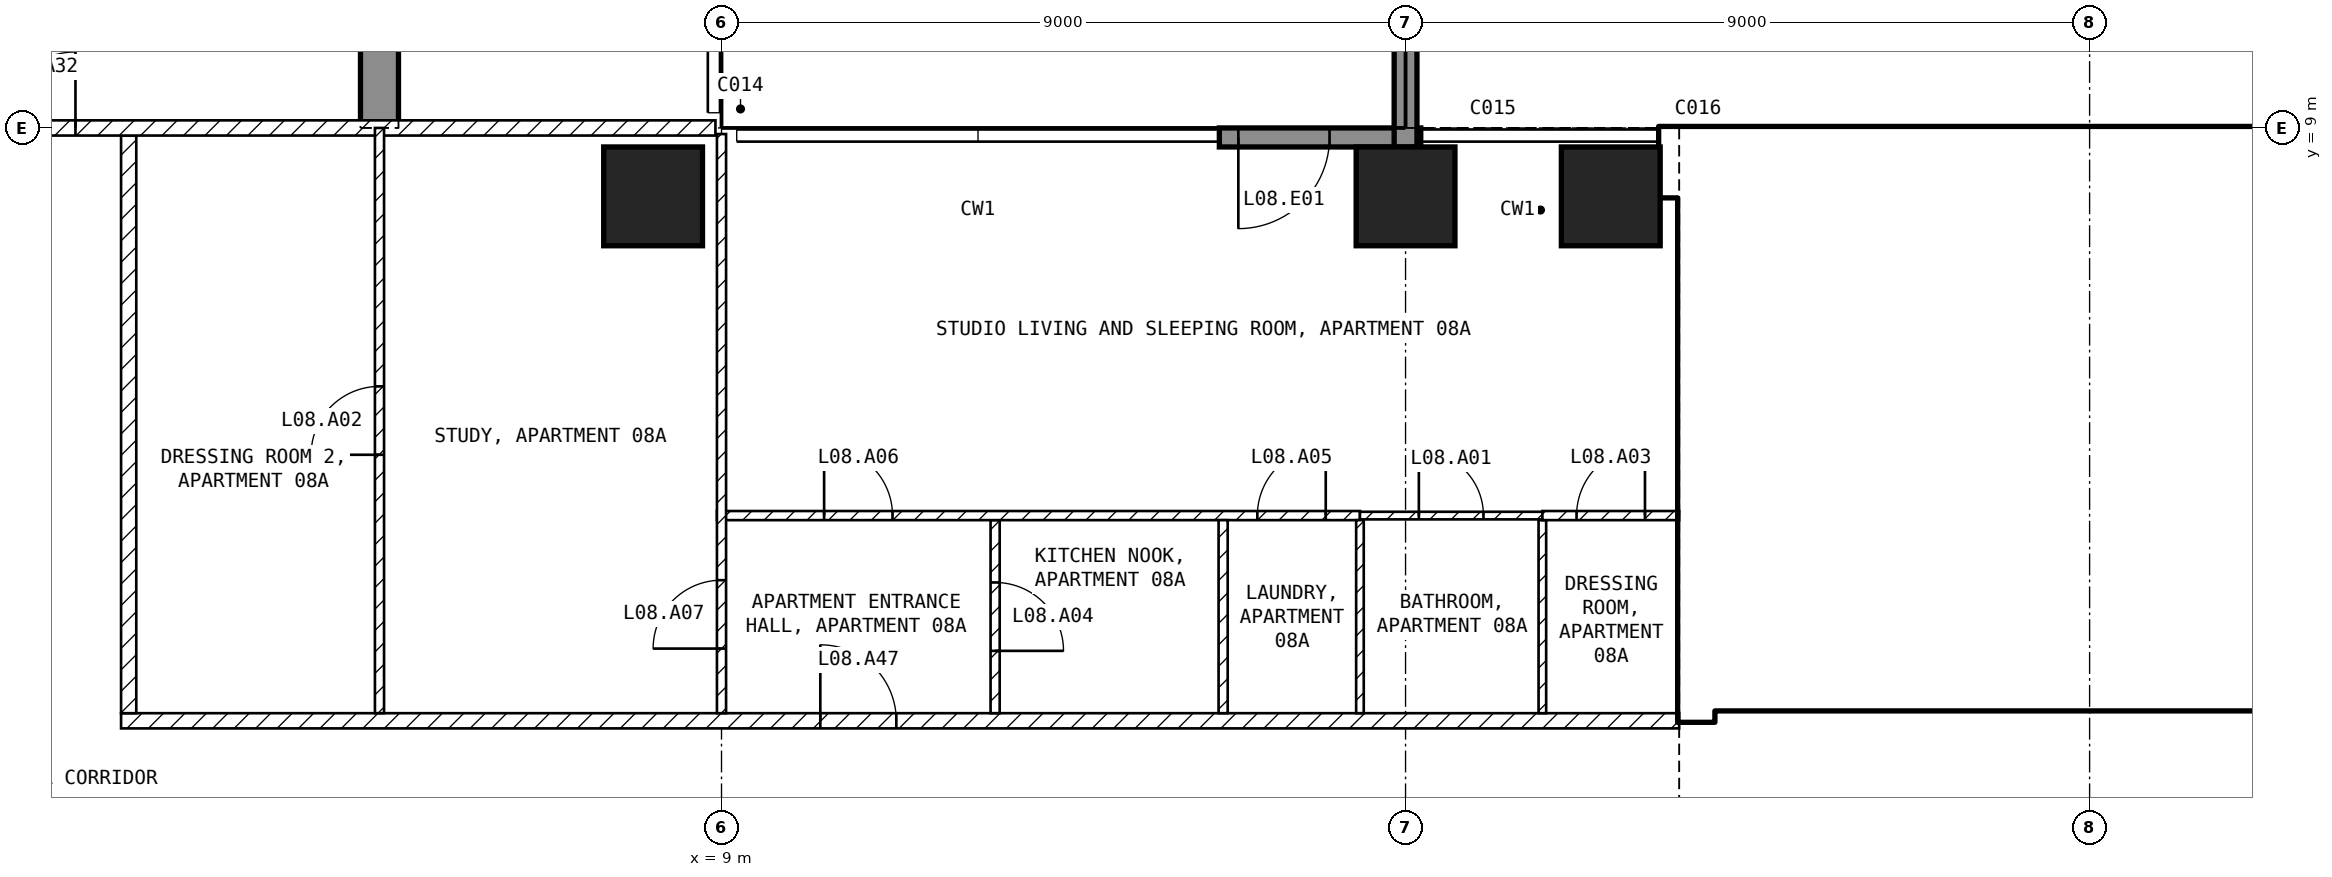
"""IFC4 building model, lengths in metres.
Left out: names, types, materials, properties, quantities, classifications, styles, units other than length and angle.
Written with IfcOpenShell. Run it as: python <this file> out.ifc"""

import sys

from ifc_helpers import new_model, si_unit, direction, frame, frame_2d, origin, origin_2d, place, context, subcontext, project, spatial, polyline, rectangle, outline, extrude, element, fill, save


model = new_model("IFC4")
c1 = context("Model", 3, precision=1e-05, world=origin(), true_north=direction((0.0, 1.0)))
c2 = subcontext(c1, "Body", "Model", "MODEL_VIEW")
j1 = project(units=[si_unit("LENGTHUNIT", "METRE"), si_unit("PLANEANGLEUNIT", "RADIAN")], contexts=[c1])
p1 = place(None, origin())
s1 = spatial("IfcSite", under=j1, at=p1, CompositionType="ELEMENT")
p2 = place(p1, origin())
s2 = spatial("IfcBuilding", under=s1, at=p2, CompositionType="ELEMENT")
p3 = place(p2, frame((0.0, 0.0, 47.0)))
s3 = spatial("IfcBuildingStorey", under=s2, at=p3, CompositionType="ELEMENT", Elevation=47.0)
for number, where, z_axis, x_axis in (
    (1, (8.1, 8.1, -0.25), (0.0, 0.0, 1.0), (1.0, 0.0, 0.0)),
    (2, (18.0, 8.1, -0.25), (0.0, 0.0, 1.0), (1.0, 0.0, 0.0)),
    (3, (20.7, 8.1, -0.25), (0.0, 0.0, 1.0), (1.0, 0.0, 0.0)),
):
    element("IfcColumn", number, at=place(p3, frame(where, z_axis=z_axis, x_axis=x_axis)), inside=s3, PredefinedType="COLUMN", context=c2, shape_type="SweptSolid", body=[
        extrude(rectangle(XDim=1.3, YDim=1.3, at=origin_2d()), origin(), (0.0, 0.0, 1.0), 3.5),
    ])
p4 = place(p3, frame((4.25, 9.0, -0.25), z_axis=(1.0, 0.0, 0.0), x_axis=(0.0, 1.0, 0.0)))
e4 = element("IfcWall", 4, at=p4, inside=s3, PredefinedType="SHEAR", context=c2, shape_type="SweptSolid", body=[
    extrude(outline(polyline([(0.0, 0.0), (2.1, 0.0), (2.1, 2.65), (4.5, 2.65), (4.5, 0.0), (9.9, 0.0), (9.9, 2.65), (12.3, 2.65), (12.3, 0.0), (16.45, 0.0), (16.45, 3.5), (0.0, 3.5), (0.0, 0.0)])), origin(), (0.0, 0.0, 1.0), 0.5),
])
p5 = place(p3, frame((18.2, 8.875, 0.0), z_axis=(0.0, 0.0, 1.0), x_axis=(-1.0, 0.0, 0.0)))
e5 = element("IfcWall", 5, at=p5, inside=s3, PredefinedType="SOLIDWALL", context=c2, shape_type="SweptSolid", body=[
    extrude(rectangle(XDim=2.65, YDim=0.25, at=frame_2d((1.325, 0.0))), origin(), (0.0, 0.0, 1.0), 3.25),
])
p6 = place(p5, frame((1.2, 0.0, 0.0)))
e6 = element("IfcOpeningElement", 6, at=p6, cuts=e5, PredefinedType="OPENING", context=c2, shape_type="SweptSolid", body=[
    extrude(rectangle(XDim=1.2, YDim=2.4, at=frame_2d((0.6, 1.2))), frame((0.0, 0.135, 0.0), z_axis=(0.0, -1.0, 0.0), x_axis=(1.0, 0.0, 0.0)), (0.0, 0.0, 1.0), 0.27),
])
p7 = place(p3, frame((18.0, 8.75, 0.0), z_axis=(0.0, 0.0, 1.0), x_axis=(0.0, 1.0, 0.0)))
e7 = element("IfcWall", 7, at=p7, inside=s3, PredefinedType="SOLIDWALL", context=c2, shape_type="SweptSolid", body=[
    extrude(rectangle(XDim=2.95, YDim=0.3, at=frame_2d((1.475, 0.0))), origin(), (0.0, 0.0, 1.0), 3.25),
])
p8 = place(p3, frame((21.35, 8.55, 0.0), z_axis=(0.0, 0.0, 1.0), x_axis=(1.0, 0.0, 0.0)))
e8 = element("IfcWall", 8, at=p8, inside=s3, PredefinedType="SHEAR", context=c2, shape_type="SweptSolid", body=[
    extrude(rectangle(XDim=10.15, YDim=0.9, at=frame_2d((5.075, 0.0))), origin(), (0.0, 0.0, 1.0), 3.25),
])
p9 = place(p3, frame((21.825, 1.2, 0.0), z_axis=(0.0, 0.0, 1.0), x_axis=(0.0, 1.0, 0.0)))
e9 = element("IfcWall", 9, at=p9, inside=s3, PredefinedType="SHEAR", context=c2, shape_type="SweptSolid", body=[
    extrude(rectangle(XDim=6.9, YDim=0.45, at=frame_2d((3.45, 0.0))), origin(), (0.0, 0.0, 1.0), 3.25),
])
p10 = place(p3, frame((22.05, 1.45, 0.0), z_axis=(0.0, 0.0, 1.0), x_axis=(1.0, 0.0, 0.0)))
e10 = element("IfcWall", 10, at=p10, inside=s3, PredefinedType="SOLIDWALL", context=c2, shape_type="SweptSolid", body=[
    extrude(rectangle(XDim=13.05, YDim=0.2, at=frame_2d((6.525, 0.0))), origin(), (0.0, 0.0, 1.0), 3.25),
])
p11 = place(p10, frame((0.75, 0.0, 0.0)))
e11 = element("IfcOpeningElement", 11, at=p11, cuts=e10, PredefinedType="OPENING", context=c2, shape_type="SweptSolid", body=[
    extrude(rectangle(XDim=1.0, YDim=2.1, at=frame_2d((0.5, 1.05))), frame((0.0, 0.11, 0.0), z_axis=(0.0, -1.0, 0.0), x_axis=(1.0, 0.0, 0.0)), (0.0, 0.0, 1.0), 0.22),
])
p12 = place(p10, frame((3.25, 0.0, 0.0)))
e12 = element("IfcOpeningElement", 12, at=p12, cuts=e10, PredefinedType="OPENING", context=c2, shape_type="SweptSolid", body=[
    extrude(rectangle(XDim=1.0, YDim=2.1, at=frame_2d((0.5, 1.05))), frame((0.0, 0.11, 0.0), z_axis=(0.0, -1.0, 0.0), x_axis=(1.0, 0.0, 0.0)), (0.0, 0.0, 1.0), 0.22),
])
p13 = place(p3, frame((22.05, 5.15, 0.0), z_axis=(0.0, 0.0, 1.0), x_axis=(1.0, 0.0, 0.0)))
e13 = element("IfcWall", 13, at=p13, inside=s3, PredefinedType="SOLIDWALL", context=c2, shape_type="SweptSolid", body=[
    extrude(rectangle(XDim=6.3, YDim=0.2, at=frame_2d((3.15, 0.0))), origin(), (0.0, 0.0, 1.0), 3.25),
])
p14 = place(p13, frame((0.2, 0.0, 0.0)))
e14 = element("IfcOpeningElement", 14, at=p14, cuts=e13, PredefinedType="OPENING", context=c2, shape_type="SweptSolid", body=[
    extrude(rectangle(XDim=1.0, YDim=2.1, at=frame_2d((0.5, 1.05))), frame((0.0, 0.11, 0.0), z_axis=(0.0, -1.0, 0.0), x_axis=(1.0, 0.0, 0.0)), (0.0, 0.0, 1.0), 0.22),
])
p15 = place(p3, frame((28.25, 5.25, 0.0), z_axis=(0.0, 0.0, 1.0), x_axis=(0.0, 1.0, 0.0)))
e15 = element("IfcWall", 15, at=p15, inside=s3, PredefinedType="SOLIDWALL", context=c2, shape_type="SweptSolid", body=[
    extrude(rectangle(XDim=2.85, YDim=0.2, at=frame_2d((1.425, 0.0))), origin(), (0.0, 0.0, 1.0), 3.25),
])
p16 = place(p3, frame((27.2, 3.95, 0.0), z_axis=(0.0, 0.0, 1.0), x_axis=(1.0, 0.0, 0.0)))
e16 = element("IfcWall", 16, at=p16, inside=s3, PredefinedType="SOLIDWALL", context=c2, shape_type="SweptSolid", body=[
    extrude(rectangle(XDim=7.9, YDim=0.2, at=frame_2d((3.95, 0.0))), origin(), (0.0, 0.0, 1.0), 3.25),
])
p17 = place(p3, frame((27.1, 1.55, 0.0), z_axis=(0.0, 0.0, 1.0), x_axis=(0.0, 1.0, 0.0)))
e17 = element("IfcWall", 17, at=p17, inside=s3, PredefinedType="SOLIDWALL", context=c2, shape_type="SweptSolid", body=[
    extrude(rectangle(XDim=3.5, YDim=0.2, at=frame_2d((1.75, 0.0))), origin(), (0.0, 0.0, 1.0), 3.25),
])
p18 = place(p17, frame((0.6, 0.0, 0.0)))
e18 = element("IfcOpeningElement", 18, at=p18, cuts=e17, PredefinedType="OPENING", context=c2, shape_type="SweptSolid", body=[
    extrude(rectangle(XDim=1.1, YDim=2.1, at=frame_2d((0.55, 1.05))), frame((0.0, 0.11, 0.0), z_axis=(0.0, -1.0, 0.0), x_axis=(1.0, 0.0, 0.0)), (0.0, 0.0, 1.0), 0.22),
])
p19 = place(p17, frame((2.6, 0.0, 0.0)))
e19 = element("IfcOpeningElement", 19, at=p19, cuts=e17, PredefinedType="OPENING", context=c2, shape_type="SweptSolid", body=[
    extrude(rectangle(XDim=0.8, YDim=2.1, at=frame_2d((0.4, 1.05))), frame((0.0, 0.11, 0.0), z_axis=(0.0, -1.0, 0.0), x_axis=(1.0, 0.0, 0.0)), (0.0, 0.0, 1.0), 0.22),
])
p20 = place(p3, frame((1.1, 1.2, 0.0), z_axis=(0.0, 0.0, 1.0), x_axis=(1.0, 0.0, 0.0)))
e20 = element("IfcWall", 20, at=p20, inside=s3, PredefinedType="PARTITIONING", context=c2, shape_type="SweptSolid", body=[
    extrude(rectangle(XDim=20.5, YDim=0.2, at=frame_2d((10.25, 0.0))), origin(), (0.0, 0.0, 1.0), 3.25),
])
p21 = place(p20, frame((9.2, 0.0, 0.0)))
e21 = element("IfcOpeningElement", 21, at=p21, cuts=e20, PredefinedType="OPENING", context=c2, shape_type="SweptSolid", body=[
    extrude(rectangle(XDim=1.0, YDim=2.1, at=frame_2d((0.5, 1.05))), frame((0.0, 0.11, 0.0), z_axis=(0.0, -1.0, 0.0), x_axis=(1.0, 0.0, 0.0)), (0.0, 0.0, 1.0), 0.22),
])
p22 = place(p3, frame((1.2, 8.9, 0.0), z_axis=(0.0, 0.0, 1.0), x_axis=(0.0, -1.0, 0.0)))
e22 = element("IfcWall", 22, at=p22, inside=s3, PredefinedType="PARTITIONING", context=c2, shape_type="SweptSolid", body=[
    extrude(rectangle(XDim=7.6, YDim=0.2, at=frame_2d((3.8, 0.0))), origin(), (0.0, 0.0, 1.0), 3.25),
])
p23 = place(p3, frame((-8.92, 9.0, 0.0), z_axis=(0.0, 0.0, 1.0), x_axis=(1.0, 0.0, 0.0)))
e23 = element("IfcWall", 23, at=p23, inside=s3, PredefinedType="PARTITIONING", context=c2, shape_type="SweptSolid", body=[
    extrude(rectangle(XDim=17.84, YDim=0.2, at=frame_2d((8.92, 0.0))), origin(), (0.0, 0.0, 1.0), 3.25),
])
p24 = place(p23, frame((8.42, 0.0, 0.0)))
e24 = element("IfcOpeningElement", 24, at=p24, cuts=e23, PredefinedType="OPENING", context=c2, shape_type="SweptSolid", body=[
    extrude(rectangle(XDim=1.0, YDim=2.1, at=frame_2d((0.5, 1.05))), frame((0.0, 0.11, 0.0), z_axis=(0.0, -1.0, 0.0), x_axis=(1.0, 0.0, 0.0)), (0.0, 0.0, 1.0), 0.22),
])
p25 = place(p3, frame((12.6, 3.84, 0.0), z_axis=(0.0, 0.0, 1.0), x_axis=(0.0, -1.0, 0.0)))
e25 = element("IfcWall", 25, at=p25, inside=s3, PredefinedType="PARTITIONING", context=c2, shape_type="SweptSolid", body=[
    extrude(rectangle(XDim=2.54, YDim=0.12, at=frame_2d((1.27, 0.0))), origin(), (0.0, 0.0, 1.0), 3.25),
])
p26 = place(p25, frame((0.82, 0.0, 0.0)))
e26 = element("IfcOpeningElement", 26, at=p26, cuts=e25, PredefinedType="OPENING", context=c2, shape_type="SweptSolid", body=[
    extrude(rectangle(XDim=0.9, YDim=2.1, at=frame_2d((0.45, 1.05))), frame((0.0, 0.07, 0.0), z_axis=(0.0, -1.0, 0.0), x_axis=(1.0, 0.0, 0.0)), (0.0, 0.0, 1.0), 0.14),
])
p27 = place(p3, frame((8.94, 3.9, 0.0), z_axis=(0.0, 0.0, 1.0), x_axis=(1.0, 0.0, 0.0)))
e27 = element("IfcWall", 27, at=p27, inside=s3, PredefinedType="PARTITIONING", context=c2, shape_type="SweptSolid", body=[
    extrude(rectangle(XDim=8.46, YDim=0.12, at=frame_2d((4.23, 0.0))), origin(), (0.0, 0.0, 1.0), 3.25),
])
p28 = place(p27, frame((7.11, 0.0, 0.0)))
e28 = element("IfcOpeningElement", 28, at=p28, cuts=e27, PredefinedType="OPENING", context=c2, shape_type="SweptSolid", body=[
    extrude(rectangle(XDim=0.9, YDim=2.1, at=frame_2d((0.45, 1.05))), frame((0.0, 0.07, 0.0), z_axis=(0.0, -1.0, 0.0), x_axis=(1.0, 0.0, 0.0)), (0.0, 0.0, 1.0), 0.14),
])
p29 = place(p27, frame((1.41, 0.0, 0.0)))
e29 = element("IfcOpeningElement", 29, at=p29, cuts=e27, PredefinedType="OPENING", context=c2, shape_type="SweptSolid", body=[
    extrude(rectangle(XDim=0.9, YDim=2.1, at=frame_2d((0.45, 1.05))), frame((0.0, 0.07, 0.0), z_axis=(0.0, -1.0, 0.0), x_axis=(1.0, 0.0, 0.0)), (0.0, 0.0, 1.0), 0.14),
])
p30 = place(p3, frame((9.0, 1.3, 0.0), z_axis=(0.0, 0.0, 1.0), x_axis=(0.0, 1.0, 0.0)))
e30 = element("IfcWall", 30, at=p30, inside=s3, PredefinedType="PARTITIONING", context=c2, shape_type="SweptSolid", body=[
    extrude(rectangle(XDim=7.62, YDim=0.12, at=frame_2d((3.81, 0.0))), origin(), (0.0, 0.0, 1.0), 3.25),
])
p31 = place(p30, frame((0.85, 0.0, 0.0)))
e31 = element("IfcOpeningElement", 31, at=p31, cuts=e30, PredefinedType="OPENING", context=c2, shape_type="SweptSolid", body=[
    extrude(rectangle(XDim=0.9, YDim=2.1, at=frame_2d((0.45, 1.05))), frame((0.0, 0.07, 0.0), z_axis=(0.0, -1.0, 0.0), x_axis=(1.0, 0.0, 0.0)), (0.0, 0.0, 1.0), 0.14),
])
p32 = place(p3, frame((15.6, 3.84, 0.0), z_axis=(0.0, 0.0, 1.0), x_axis=(0.0, -1.0, 0.0)))
e32 = element("IfcWall", 32, at=p32, inside=s3, PredefinedType="PARTITIONING", context=c2, shape_type="SweptSolid", body=[
    extrude(rectangle(XDim=2.54, YDim=0.12, at=frame_2d((1.27, 0.0))), origin(), (0.0, 0.0, 1.0), 3.25),
])
for number, where, z_axis, x_axis in (
    (33, (17.4, 3.84, 0.0), (0.0, 0.0, 1.0), (0.0, -1.0, 0.0)),
    (34, (19.8, 3.84, 0.0), (0.0, 0.0, 1.0), (0.0, -1.0, 0.0)),
):
    element("IfcWall", number, at=place(p3, frame(where, z_axis=z_axis, x_axis=x_axis)), inside=s3, PredefinedType="PARTITIONING", context=c2, shape_type="SweptSolid", body=[
        extrude(rectangle(XDim=2.54, YDim=0.1, at=frame_2d((1.27, 0.0))), origin(), (0.0, 0.0, 1.0), 3.25),
    ])
p33 = place(p3, frame((17.4, 3.9, 0.0), z_axis=(0.0, 0.0, 1.0), x_axis=(1.0, 0.0, 0.0)))
e35 = element("IfcWall", 35, at=p33, inside=s3, PredefinedType="PARTITIONING", context=c2, shape_type="SweptSolid", body=[
    extrude(rectangle(XDim=2.4, YDim=0.1, at=frame_2d((1.2, 0.0))), origin(), (0.0, 0.0, 1.0), 3.25),
])
p34 = place(p33, frame((0.775, 0.0, 0.0)))
e36 = element("IfcOpeningElement", 36, at=p34, cuts=e35, PredefinedType="OPENING", context=c2, shape_type="SweptSolid", body=[
    extrude(rectangle(XDim=0.85, YDim=2.1, at=frame_2d((0.425, 1.05))), frame((0.0, 0.06, 0.0), z_axis=(0.0, -1.0, 0.0), x_axis=(1.0, 0.0, 0.0)), (0.0, 0.0, 1.0), 0.12),
])
p35 = place(p3, frame((19.8, 3.9, 0.0), z_axis=(0.0, 0.0, 1.0), x_axis=(1.0, 0.0, 0.0)))
e37 = element("IfcWall", 37, at=p35, inside=s3, PredefinedType="PARTITIONING", context=c2, shape_type="SweptSolid", body=[
    extrude(rectangle(XDim=1.8, YDim=0.12, at=frame_2d((0.9, 0.0))), origin(), (0.0, 0.0, 1.0), 3.25),
])
p36 = place(p35, frame((0.45, 0.0, 0.0)))
e38 = element("IfcOpeningElement", 38, at=p36, cuts=e37, PredefinedType="OPENING", context=c2, shape_type="SweptSolid", body=[
    extrude(rectangle(XDim=0.9, YDim=2.1, at=frame_2d((0.45, 1.05))), frame((0.0, 0.07, 0.0), z_axis=(0.0, -1.0, 0.0), x_axis=(1.0, 0.0, 0.0)), (0.0, 0.0, 1.0), 0.14),
])
p37 = place(p3, frame((4.5, 1.3, 0.0), z_axis=(0.0, 0.0, 1.0), x_axis=(0.0, 1.0, 0.0)))
e39 = element("IfcWall", 39, at=p37, inside=s3, PredefinedType="PARTITIONING", context=c2, shape_type="SweptSolid", body=[
    extrude(rectangle(XDim=7.7, YDim=0.12, at=frame_2d((3.85, 0.0))), origin(), (0.0, 0.0, 1.0), 3.25),
])
p38 = place(p37, frame((3.4, 0.0, 0.0)))
e40 = element("IfcOpeningElement", 40, at=p38, cuts=e39, PredefinedType="OPENING", context=c2, shape_type="SweptSolid", body=[
    extrude(rectangle(XDim=0.9, YDim=2.1, at=frame_2d((0.45, 1.05))), frame((0.0, 0.07, 0.0), z_axis=(0.0, -1.0, 0.0), x_axis=(1.0, 0.0, 0.0)), (0.0, 0.0, 1.0), 0.14),
])
p39 = place(p6, origin())
e41 = element("IfcDoor", 41, at=p39, inside=s3, OperationType="SINGLE_SWING_RIGHT", PredefinedType="DOOR", context=c2, shape_type="SweptSolid", body=[
    extrude(rectangle(XDim=1.2, YDim=2.4, at=frame_2d((0.6, 1.2))), frame((0.0, 0.025, 0.0), z_axis=(0.0, -1.0, 0.0), x_axis=(1.0, 0.0, 0.0)), (0.0, 0.0, 1.0), 0.05),
])
fill(e6, e41)
p40 = place(p18, origin())
e42 = element("IfcDoor", 42, at=p40, inside=s3, OperationType="DOUBLE_DOOR_SLIDING", PredefinedType="DOOR", context=c2, shape_type="SweptSolid", body=[
    extrude(rectangle(XDim=1.1, YDim=2.1, at=frame_2d((0.55, 1.05))), frame((0.0, 0.025, 0.0), z_axis=(0.0, -1.0, 0.0), x_axis=(1.0, 0.0, 0.0)), (0.0, 0.0, 1.0), 0.05),
])
fill(e18, e42)
p41 = place(p14, origin())
e43 = element("IfcDoor", 43, at=p41, inside=s3, OperationType="SINGLE_SWING_LEFT", PredefinedType="DOOR", context=c2, shape_type="SweptSolid", body=[
    extrude(rectangle(XDim=1.0, YDim=2.1, at=frame_2d((0.5, 1.05))), frame((0.0, 0.025, 0.0), z_axis=(0.0, -1.0, 0.0), x_axis=(1.0, 0.0, 0.0)), (0.0, 0.0, 1.0), 0.05),
])
fill(e14, e43)
p42 = place(p11, origin())
e44 = element("IfcDoor", 44, at=p42, inside=s3, OperationType="SINGLE_SWING_LEFT", PredefinedType="DOOR", context=c2, shape_type="SweptSolid", body=[
    extrude(rectangle(XDim=1.0, YDim=2.1, at=frame_2d((0.5, 1.05))), frame((0.0, 0.025, 0.0), z_axis=(0.0, -1.0, 0.0), x_axis=(1.0, 0.0, 0.0)), (0.0, 0.0, 1.0), 0.05),
])
fill(e11, e44)
p43 = place(p12, origin())
e45 = element("IfcDoor", 45, at=p43, inside=s3, OperationType="SINGLE_SWING_LEFT", PredefinedType="DOOR", context=c2, shape_type="SweptSolid", body=[
    extrude(rectangle(XDim=1.0, YDim=2.1, at=frame_2d((0.5, 1.05))), frame((0.0, 0.025, 0.0), z_axis=(0.0, -1.0, 0.0), x_axis=(1.0, 0.0, 0.0)), (0.0, 0.0, 1.0), 0.05),
])
fill(e12, e45)
p44 = place(p19, origin())
e46 = element("IfcDoor", 46, at=p44, inside=s3, OperationType="SINGLE_SWING_LEFT", PredefinedType="DOOR", context=c2, shape_type="SweptSolid", body=[
    extrude(rectangle(XDim=0.8, YDim=2.1, at=frame_2d((0.4, 1.05))), frame((0.0, 0.025, 0.0), z_axis=(0.0, -1.0, 0.0), x_axis=(1.0, 0.0, 0.0)), (0.0, 0.0, 1.0), 0.05),
])
fill(e19, e46)
p45 = place(p34, origin())
e47 = element("IfcDoor", 47, at=p45, inside=s3, OperationType="SINGLE_SWING_LEFT", PredefinedType="DOOR", context=c2, shape_type="SweptSolid", body=[
    extrude(rectangle(XDim=0.85, YDim=2.1, at=frame_2d((0.425, 1.05))), frame((0.0, 0.025, 0.0), z_axis=(0.0, -1.0, 0.0), x_axis=(1.0, 0.0, 0.0)), (0.0, 0.0, 1.0), 0.05),
])
fill(e36, e47)
p46 = place(p38, origin())
e48 = element("IfcDoor", 48, at=p46, inside=s3, OperationType="SINGLE_SWING_LEFT", PredefinedType="DOOR", context=c2, shape_type="SweptSolid", body=[
    extrude(rectangle(XDim=0.9, YDim=2.1, at=frame_2d((0.45, 1.05))), frame((0.0, 0.025, 0.0), z_axis=(0.0, -1.0, 0.0), x_axis=(1.0, 0.0, 0.0)), (0.0, 0.0, 1.0), 0.05),
])
fill(e40, e48)
p47 = place(p36, origin())
e49 = element("IfcDoor", 49, at=p47, inside=s3, OperationType="SINGLE_SWING_RIGHT", PredefinedType="DOOR", context=c2, shape_type="SweptSolid", body=[
    extrude(rectangle(XDim=0.9, YDim=2.1, at=frame_2d((0.45, 1.05))), frame((0.0, 0.025, 0.0), z_axis=(0.0, -1.0, 0.0), x_axis=(1.0, 0.0, 0.0)), (0.0, 0.0, 1.0), 0.05),
])
fill(e38, e49)
p48 = place(p26, origin())
e50 = element("IfcDoor", 50, at=p48, inside=s3, OperationType="SINGLE_SWING_RIGHT", PredefinedType="DOOR", context=c2, shape_type="SweptSolid", body=[
    extrude(rectangle(XDim=0.9, YDim=2.1, at=frame_2d((0.45, 1.05))), frame((0.0, 0.025, 0.0), z_axis=(0.0, -1.0, 0.0), x_axis=(1.0, 0.0, 0.0)), (0.0, 0.0, 1.0), 0.05),
])
fill(e26, e50)
p49 = place(p28, origin())
e51 = element("IfcDoor", 51, at=p49, inside=s3, OperationType="SINGLE_SWING_RIGHT", PredefinedType="DOOR", context=c2, shape_type="SweptSolid", body=[
    extrude(rectangle(XDim=0.9, YDim=2.1, at=frame_2d((0.45, 1.05))), frame((0.0, 0.025, 0.0), z_axis=(0.0, -1.0, 0.0), x_axis=(1.0, 0.0, 0.0)), (0.0, 0.0, 1.0), 0.05),
])
fill(e28, e51)
p50 = place(p29, origin())
e52 = element("IfcDoor", 52, at=p50, inside=s3, OperationType="SINGLE_SWING_LEFT", PredefinedType="DOOR", context=c2, shape_type="SweptSolid", body=[
    extrude(rectangle(XDim=0.9, YDim=2.1, at=frame_2d((0.45, 1.05))), frame((0.0, 0.025, 0.0), z_axis=(0.0, -1.0, 0.0), x_axis=(1.0, 0.0, 0.0)), (0.0, 0.0, 1.0), 0.05),
])
fill(e29, e52)
p51 = place(p31, origin())
e53 = element("IfcDoor", 53, at=p51, inside=s3, OperationType="SINGLE_SWING_LEFT", PredefinedType="DOOR", context=c2, shape_type="SweptSolid", body=[
    extrude(rectangle(XDim=0.9, YDim=2.1, at=frame_2d((0.45, 1.05))), frame((0.0, 0.025, 0.0), z_axis=(0.0, -1.0, 0.0), x_axis=(1.0, 0.0, 0.0)), (0.0, 0.0, 1.0), 0.05),
])
fill(e31, e53)
p52 = place(p24, origin())
e54 = element("IfcDoor", 54, at=p52, inside=s3, OperationType="SINGLE_SWING_RIGHT", PredefinedType="DOOR", context=c2, shape_type="SweptSolid", body=[
    extrude(rectangle(XDim=1.0, YDim=2.1, at=frame_2d((0.5, 1.05))), frame((0.0, 0.025, 0.0), z_axis=(0.0, -1.0, 0.0), x_axis=(1.0, 0.0, 0.0)), (0.0, 0.0, 1.0), 0.05),
])
fill(e24, e54)
p53 = place(p21, origin())
e55 = element("IfcDoor", 55, at=p53, inside=s3, OperationType="SINGLE_SWING_LEFT", PredefinedType="DOOR", context=c2, shape_type="SweptSolid", body=[
    extrude(rectangle(XDim=1.0, YDim=2.1, at=frame_2d((0.5, 1.05))), frame((0.0, 0.025, 0.0), z_axis=(0.0, -1.0, 0.0), x_axis=(1.0, 0.0, 0.0)), (0.0, 0.0, 1.0), 0.05),
])
fill(e21, e55)
save(model, sys.argv[1])
